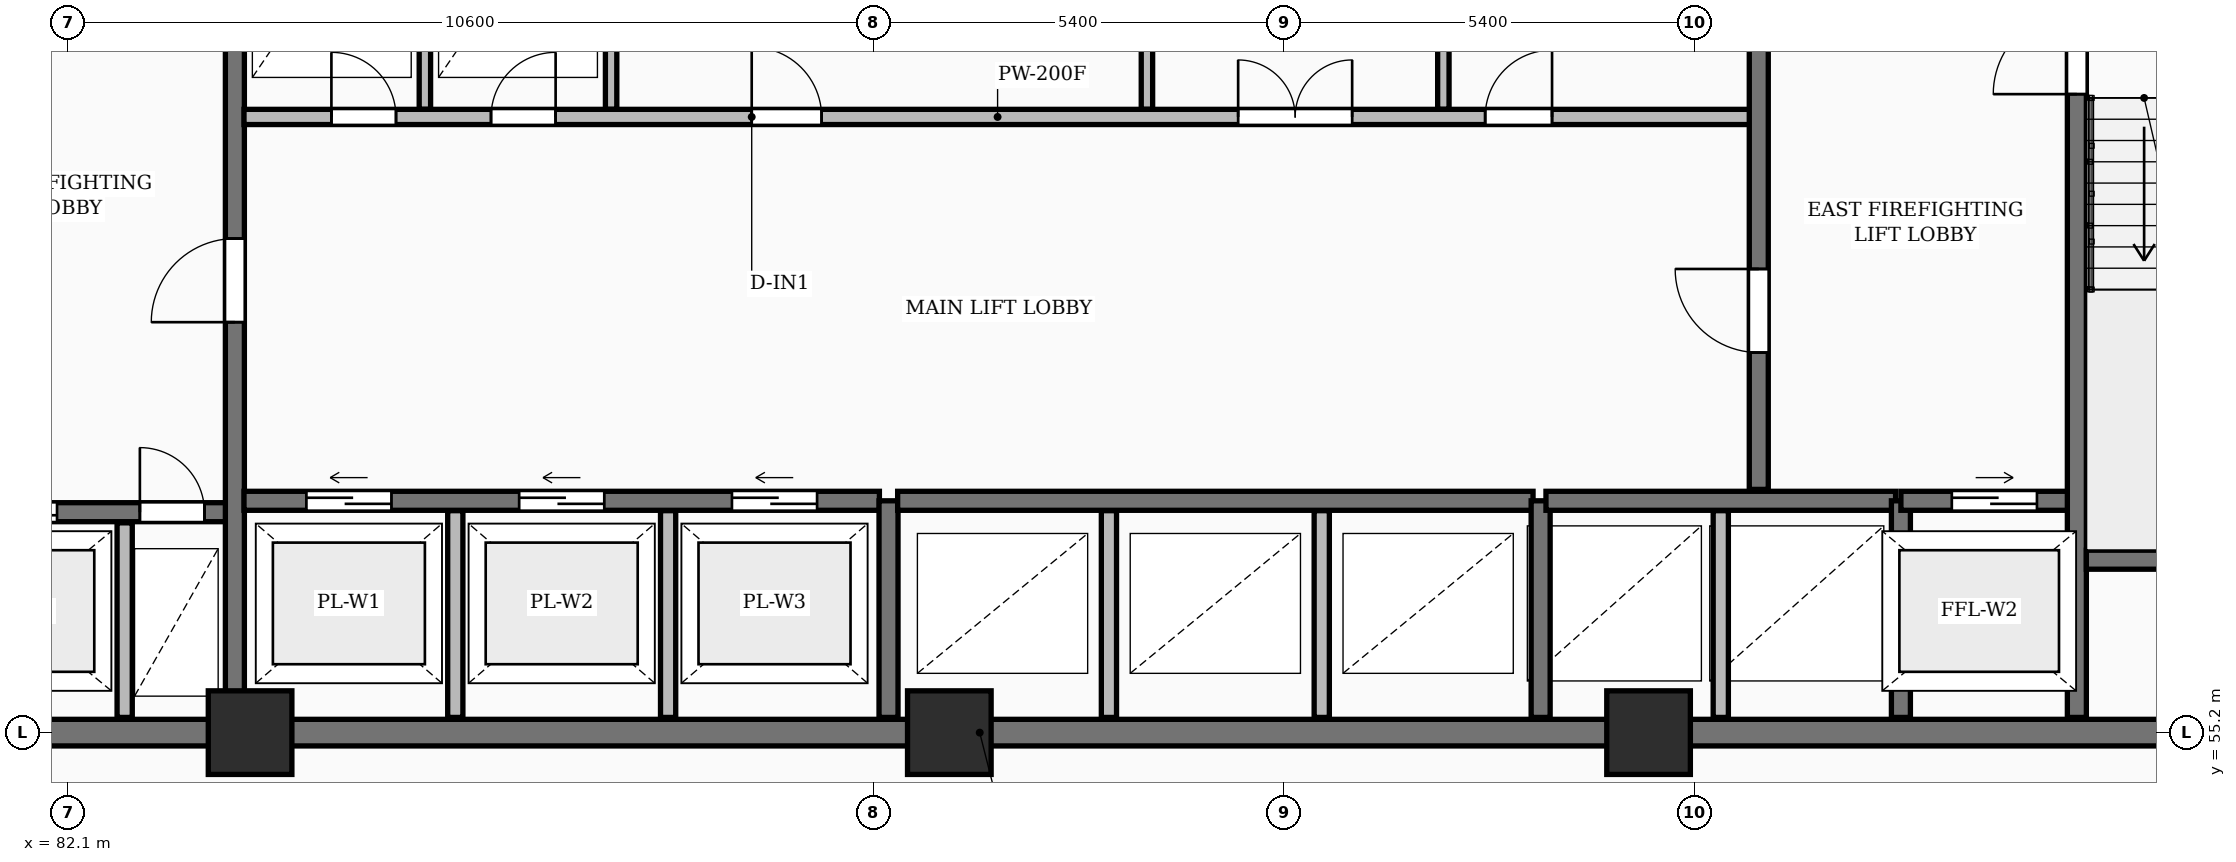
"""IFC4 building model, lengths in metres.
Left out: names, types, materials, properties, quantities, classifications, styles, units other than length and angle.
Written with IfcOpenShell. Run it as: python <this file> out.ifc"""

import sys

from ifc_helpers import new_model, si_unit, direction, frame, frame_2d, origin, origin_2d, place, context, subcontext, project, spatial, rectangle, extrude, element, fill, save


model = new_model("IFC4")
c1 = context("Model", 3, precision=1e-05, world=origin(), true_north=direction((0.0, 1.0)))
c2 = subcontext(c1, "Body", "Model", "MODEL_VIEW")
j1 = project(units=[si_unit("LENGTHUNIT", "METRE"), si_unit("PLANEANGLEUNIT", "RADIAN")], contexts=[c1])
p1 = place(None, origin())
s1 = spatial("IfcSite", under=j1, at=p1, CompositionType="ELEMENT")
p2 = place(p1, origin())
s2 = spatial("IfcBuilding", under=s1, at=p2, CompositionType="ELEMENT")
p3 = place(p2, frame((0.0, 0.0, -3.6)))
s3 = spatial("IfcBuildingStorey", under=s2, at=p3, CompositionType="ELEMENT", Elevation=-3.6)
for number, where, z_axis, x_axis in (
    (1, (84.5, 55.2, 0.0), (0.0, 0.0, 1.0), (1.0, 0.0, 0.0)),
    (2, (93.7, 55.2, 0.0), (0.0, 0.0, 1.0), (1.0, 0.0, 0.0)),
    (3, (102.9, 55.2, 0.0), (0.0, 0.0, 1.0), (1.0, 0.0, 0.0)),
):
    element("IfcColumn", number, at=place(p3, frame(where, z_axis=z_axis, x_axis=x_axis)), inside=s3, PredefinedType="COLUMN", context=c2, shape_type="SweptSolid", body=[
        extrude(rectangle(XDim=1.1, YDim=1.1, at=origin_2d()), origin(), (0.0, 0.0, 1.0), 3.6),
    ])
p4 = place(p3, frame((75.95, 55.2, 0.0), z_axis=(0.0, 0.0, 1.0), x_axis=(1.0, 0.0, 0.0)))
e4 = element("IfcWall", 4, at=p4, inside=s3, PredefinedType="SHEAR", context=c2, shape_type="SweptSolid", body=[
    extrude(rectangle(XDim=36.3, YDim=0.35, at=frame_2d((18.15, 0.0))), origin(), (0.0, 0.0, 1.0), 3.6),
])
p5 = place(p3, frame((79.79, 58.1, 0.0), z_axis=(0.0, 0.0, 1.0), x_axis=(1.0, 0.0, 0.0)))
e5 = element("IfcWall", 5, at=p5, inside=s3, PredefinedType="SHEAR", context=c2, shape_type="SweptSolid", body=[
    extrude(rectangle(XDim=4.39, YDim=0.25, at=frame_2d((2.195, 0.0))), origin(), (0.0, 0.0, 1.0), 3.6),
])
p6 = place(p5, frame((1.05, 0.0, 0.0)))
e6 = element("IfcOpeningElement", 6, at=p6, cuts=e5, PredefinedType="OPENING", context=c2, shape_type="SweptSolid", body=[
    extrude(rectangle(XDim=1.12, YDim=2.12, at=frame_2d((0.56, 1.06))), frame((0.0, 0.135, 0.0), z_axis=(0.0, -1.0, 0.0), x_axis=(1.0, 0.0, 0.0)), (0.0, 0.0, 1.0), 0.27),
])
p7 = place(p5, frame((3.26, 0.0, 0.0)))
e7 = element("IfcOpeningElement", 7, at=p7, cuts=e5, PredefinedType="OPENING", context=c2, shape_type="SweptSolid", body=[
    extrude(rectangle(XDim=0.85, YDim=2.05, at=frame_2d((0.425, 1.025))), frame((0.0, 0.135, 0.0), z_axis=(0.0, -1.0, 0.0), x_axis=(1.0, 0.0, 0.0)), (0.0, 0.0, 1.0), 0.27),
])
p8 = place(p3, frame((82.85, 55.4, 0.0), z_axis=(0.0, 0.0, 1.0), x_axis=(0.0, 1.0, 0.0)))
e8 = element("IfcWall", 8, at=p8, inside=s3, PredefinedType="PARTITIONING", context=c2, shape_type="SweptSolid", body=[
    extrude(rectangle(XDim=2.56, YDim=0.2, at=frame_2d((1.28, 0.0))), origin(), (0.0, 0.0, 1.0), 3.3),
])
p9 = place(p3, frame((84.3, 55.4, 0.0), z_axis=(0.0, 0.0, 1.0), x_axis=(0.0, 1.0, 0.0)))
e9 = element("IfcWall", 9, at=p9, inside=s3, PredefinedType="SHEAR", context=c2, shape_type="SweptSolid", body=[
    extrude(rectangle(XDim=11.6, YDim=0.25, at=frame_2d((5.8, 0.0))), origin(), (0.0, 0.0, 1.0), 3.6),
])
p10 = place(p9, frame((5.2, 0.0, 0.0)))
e10 = element("IfcOpeningElement", 10, at=p10, cuts=e9, PredefinedType="OPENING", context=c2, shape_type="SweptSolid", body=[
    extrude(rectangle(XDim=1.1, YDim=2.1, at=frame_2d((0.55, 1.05))), frame((0.0, 0.135, 0.0), z_axis=(0.0, -1.0, 0.0), x_axis=(1.0, 0.0, 0.0)), (0.0, 0.0, 1.0), 0.27),
])
for number, where, z_axis, x_axis in (
    (11, (87.2, 55.4, 0.0), (0.0, 0.0, 1.0), (0.0, 1.0, 0.0)),
    (12, (90.0, 55.4, 0.0), (0.0, 0.0, 1.0), (0.0, 1.0, 0.0)),
):
    element("IfcWall", number, at=place(p3, frame(where, z_axis=z_axis, x_axis=x_axis)), inside=s3, PredefinedType="PARTITIONING", context=c2, shape_type="SweptSolid", body=[
        extrude(rectangle(XDim=2.72, YDim=0.2, at=frame_2d((1.36, 0.0))), origin(), (0.0, 0.0, 1.0), 3.3),
    ])
p11 = place(p3, frame((84.42, 58.25, 0.0), z_axis=(0.0, 0.0, 1.0), x_axis=(1.0, 0.0, 0.0)))
e13 = element("IfcWall", 13, at=p11, inside=s3, PredefinedType="SHEAR", context=c2, shape_type="SweptSolid", body=[
    extrude(rectangle(XDim=8.36, YDim=0.25, at=frame_2d((4.18, 0.0))), origin(), (0.0, 0.0, 1.0), 3.6),
])
p12 = place(p11, frame((0.82, 0.0, 0.0)))
e14 = element("IfcOpeningElement", 14, at=p12, cuts=e13, PredefinedType="OPENING", context=c2, shape_type="SweptSolid", body=[
    extrude(rectangle(XDim=1.12, YDim=2.12, at=frame_2d((0.56, 1.06))), frame((0.0, 0.135, 0.0), z_axis=(0.0, -1.0, 0.0), x_axis=(1.0, 0.0, 0.0)), (0.0, 0.0, 1.0), 0.27),
])
p13 = place(p11, frame((3.62, 0.0, 0.0)))
e15 = element("IfcOpeningElement", 15, at=p13, cuts=e13, PredefinedType="OPENING", context=c2, shape_type="SweptSolid", body=[
    extrude(rectangle(XDim=1.12, YDim=2.12, at=frame_2d((0.56, 1.06))), frame((0.0, 0.135, 0.0), z_axis=(0.0, -1.0, 0.0), x_axis=(1.0, 0.0, 0.0)), (0.0, 0.0, 1.0), 0.27),
])
p14 = place(p11, frame((6.42, 0.0, 0.0)))
e16 = element("IfcOpeningElement", 16, at=p14, cuts=e13, PredefinedType="OPENING", context=c2, shape_type="SweptSolid", body=[
    extrude(rectangle(XDim=1.12, YDim=2.12, at=frame_2d((0.56, 1.06))), frame((0.0, 0.135, 0.0), z_axis=(0.0, -1.0, 0.0), x_axis=(1.0, 0.0, 0.0)), (0.0, 0.0, 1.0), 0.27),
])
p15 = place(p3, frame((92.9, 55.4, 0.0), z_axis=(0.0, 0.0, 1.0), x_axis=(0.0, 1.0, 0.0)))
e17 = element("IfcWall", 17, at=p15, inside=s3, PredefinedType="SHEAR", context=c2, shape_type="SweptSolid", body=[
    extrude(rectangle(XDim=2.85, YDim=0.25, at=frame_2d((1.425, 0.0))), origin(), (0.0, 0.0, 1.0), 3.6),
])
for number, where, z_axis, x_axis in (
    (18, (95.8, 55.4, 0.0), (0.0, 0.0, 1.0), (0.0, 1.0, 0.0)),
    (19, (98.6, 55.4, 0.0), (0.0, 0.0, 1.0), (0.0, 1.0, 0.0)),
):
    element("IfcWall", number, at=place(p3, frame(where, z_axis=z_axis, x_axis=x_axis)), inside=s3, PredefinedType="PARTITIONING", context=c2, shape_type="SweptSolid", body=[
        extrude(rectangle(XDim=2.72, YDim=0.2, at=frame_2d((1.36, 0.0))), origin(), (0.0, 0.0, 1.0), 3.3),
    ])
p16 = place(p3, frame((93.02, 58.25, 0.0), z_axis=(0.0, 0.0, 1.0), x_axis=(1.0, 0.0, 0.0)))
e20 = element("IfcWall", 20, at=p16, inside=s3, PredefinedType="SHEAR", context=c2, shape_type="SweptSolid", body=[
    extrude(rectangle(XDim=8.36, YDim=0.25, at=frame_2d((4.18, 0.0))), origin(), (0.0, 0.0, 1.0), 3.6),
])
p17 = place(p3, frame((101.48, 55.4, 0.0), z_axis=(0.0, 0.0, 1.0), x_axis=(0.0, 1.0, 0.0)))
e21 = element("IfcWall", 21, at=p17, inside=s3, PredefinedType="SHEAR", context=c2, shape_type="SweptSolid", body=[
    extrude(rectangle(XDim=2.85, YDim=0.25, at=frame_2d((1.425, 0.0))), origin(), (0.0, 0.0, 1.0), 3.6),
])
p18 = place(p3, frame((103.85, 55.4, 0.0), z_axis=(0.0, 0.0, 1.0), x_axis=(0.0, 1.0, 0.0)))
e22 = element("IfcWall", 22, at=p18, inside=s3, PredefinedType="PARTITIONING", context=c2, shape_type="SweptSolid", body=[
    extrude(rectangle(XDim=2.72, YDim=0.2, at=frame_2d((1.36, 0.0))), origin(), (0.0, 0.0, 1.0), 3.3),
])
p19 = place(p3, frame((101.55, 58.25, 0.0), z_axis=(0.0, 0.0, 1.0), x_axis=(1.0, 0.0, 0.0)))
e23 = element("IfcWall", 23, at=p19, inside=s3, PredefinedType="SHEAR", context=c2, shape_type="SweptSolid", body=[
    extrude(rectangle(XDim=4.6, YDim=0.25, at=frame_2d((2.3, 0.0))), origin(), (0.0, 0.0, 1.0), 3.6),
])
p20 = place(p3, frame((106.22, 55.4, 0.0), z_axis=(0.0, 0.0, 1.0), x_axis=(0.0, 1.0, 0.0)))
e24 = element("IfcWall", 24, at=p20, inside=s3, PredefinedType="SHEAR", context=c2, shape_type="SweptSolid", body=[
    extrude(rectangle(XDim=2.85, YDim=0.25, at=frame_2d((1.425, 0.0))), origin(), (0.0, 0.0, 1.0), 3.6),
])
p21 = place(p3, frame((106.22, 58.25, 0.0), z_axis=(0.0, 0.0, 1.0), x_axis=(1.0, 0.0, 0.0)))
e25 = element("IfcWall", 25, at=p21, inside=s3, PredefinedType="SHEAR", context=c2, shape_type="SweptSolid", body=[
    extrude(rectangle(XDim=2.46, YDim=0.25, at=frame_2d((1.23, 0.0))), origin(), (0.0, 0.0, 1.0), 3.6),
])
p22 = place(p21, frame((0.67, 0.0, 0.0)))
e26 = element("IfcOpeningElement", 26, at=p22, cuts=e25, PredefinedType="OPENING", context=c2, shape_type="SweptSolid", body=[
    extrude(rectangle(XDim=1.12, YDim=2.12, at=frame_2d((0.56, 1.06))), frame((0.0, 0.135, 0.0), z_axis=(0.0, -1.0, 0.0), x_axis=(1.0, 0.0, 0.0)), (0.0, 0.0, 1.0), 0.27),
])
for number, where, z_axis, x_axis in (
    (27, (86.8, 63.4, 0.0), (0.0, 0.0, 1.0), (0.0, 1.0, 0.0)),
    (28, (89.25, 63.4, 0.0), (0.0, 0.0, 1.0), (0.0, 1.0, 0.0)),
    (29, (96.3, 63.4, 0.0), (0.0, 0.0, 1.0), (0.0, 1.0, 0.0)),
    (30, (100.2, 63.4, 0.0), (0.0, 0.0, 1.0), (0.0, 1.0, 0.0)),
):
    element("IfcWall", number, at=place(p3, frame(where, z_axis=z_axis, x_axis=x_axis)), inside=s3, PredefinedType="PARTITIONING", context=c2, shape_type="SweptSolid", body=[
        extrude(rectangle(XDim=3.6, YDim=0.15, at=frame_2d((1.8, 0.0))), origin(), (0.0, 0.0, 1.0), 3.3),
    ])
p23 = place(p3, frame((84.42, 63.3, 0.0), z_axis=(0.0, 0.0, 1.0), x_axis=(1.0, 0.0, 0.0)))
e31 = element("IfcWall", 31, at=p23, inside=s3, PredefinedType="PARTITIONING", context=c2, shape_type="SweptSolid", body=[
    extrude(rectangle(XDim=19.83, YDim=0.2, at=frame_2d((9.915, 0.0))), origin(), (0.0, 0.0, 1.0), 3.3),
])
p24 = place(p23, frame((1.15, 0.0, 0.0)))
e32 = element("IfcOpeningElement", 32, at=p24, cuts=e31, PredefinedType="OPENING", context=c2, shape_type="SweptSolid", body=[
    extrude(rectangle(XDim=0.85, YDim=2.05, at=frame_2d((0.425, 1.025))), frame((0.0, 0.11, 0.0), z_axis=(0.0, -1.0, 0.0), x_axis=(1.0, 0.0, 0.0)), (0.0, 0.0, 1.0), 0.22),
])
p25 = place(p23, frame((3.25, 0.0, 0.0)))
e33 = element("IfcOpeningElement", 33, at=p25, cuts=e31, PredefinedType="OPENING", context=c2, shape_type="SweptSolid", body=[
    extrude(rectangle(XDim=0.85, YDim=2.05, at=frame_2d((0.425, 1.025))), frame((0.0, 0.11, 0.0), z_axis=(0.0, -1.0, 0.0), x_axis=(1.0, 0.0, 0.0)), (0.0, 0.0, 1.0), 0.22),
])
p26 = place(p23, frame((13.08, 0.0, 0.0)))
e34 = element("IfcOpeningElement", 34, at=p26, cuts=e31, PredefinedType="OPENING", context=c2, shape_type="SweptSolid", body=[
    extrude(rectangle(XDim=1.5, YDim=2.2, at=frame_2d((0.75, 1.1))), frame((0.0, 0.11, 0.0), z_axis=(0.0, -1.0, 0.0), x_axis=(1.0, 0.0, 0.0)), (0.0, 0.0, 1.0), 0.22),
])
p27 = place(p23, frame((6.68, 0.0, 0.0)))
e35 = element("IfcOpeningElement", 35, at=p27, cuts=e31, PredefinedType="OPENING", context=c2, shape_type="SweptSolid", body=[
    extrude(rectangle(XDim=0.92, YDim=2.08, at=frame_2d((0.46, 1.04))), frame((0.0, 0.11, 0.0), z_axis=(0.0, -1.0, 0.0), x_axis=(1.0, 0.0, 0.0)), (0.0, 0.0, 1.0), 0.22),
])
p28 = place(p23, frame((16.33, 0.0, 0.0)))
e36 = element("IfcOpeningElement", 36, at=p28, cuts=e31, PredefinedType="OPENING", context=c2, shape_type="SweptSolid", body=[
    extrude(rectangle(XDim=0.88, YDim=2.06, at=frame_2d((0.44, 1.03))), frame((0.0, 0.11, 0.0), z_axis=(0.0, -1.0, 0.0), x_axis=(1.0, 0.0, 0.0)), (0.0, 0.0, 1.0), 0.22),
])
p29 = place(p3, frame((104.35, 58.4, 0.0), z_axis=(0.0, 0.0, 1.0), x_axis=(0.0, 1.0, 0.0)))
e37 = element("IfcWall", 37, at=p29, inside=s3, PredefinedType="SHEAR", context=c2, shape_type="SweptSolid", body=[
    extrude(rectangle(XDim=8.6, YDim=0.25, at=frame_2d((4.3, 0.0))), origin(), (0.0, 0.0, 1.0), 3.6),
])
p30 = place(p29, frame((1.8, 0.0, 0.0)))
e38 = element("IfcOpeningElement", 38, at=p30, cuts=e37, PredefinedType="OPENING", context=c2, shape_type="SweptSolid", body=[
    extrude(rectangle(XDim=1.1, YDim=2.1, at=frame_2d((0.55, 1.05))), frame((0.0, 0.135, 0.0), z_axis=(0.0, -1.0, 0.0), x_axis=(1.0, 0.0, 0.0)), (0.0, 0.0, 1.0), 0.27),
])
p31 = place(p3, frame((108.535, 55.4, 0.0), z_axis=(0.0, 0.0, 1.0), x_axis=(0.0, 1.0, 0.0)))
e39 = element("IfcWall", 39, at=p31, inside=s3, PredefinedType="SHEAR", context=c2, shape_type="SweptSolid", body=[
    extrude(rectangle(XDim=11.6, YDim=0.25, at=frame_2d((5.8, 0.0))), origin(), (0.0, 0.0, 1.0), 3.6),
])
p32 = place(p31, frame((8.2, 0.0, 0.0)))
e40 = element("IfcOpeningElement", 40, at=p32, cuts=e39, PredefinedType="OPENING", context=c2, shape_type="SweptSolid", body=[
    extrude(rectangle(XDim=1.1, YDim=2.1, at=frame_2d((0.55, 1.05))), frame((0.0, 0.135, 0.0), z_axis=(0.0, -1.0, 0.0), x_axis=(1.0, 0.0, 0.0)), (0.0, 0.0, 1.0), 0.27),
])
p33 = place(p31, frame((10.25, 0.0, 0.0)))
e41 = element("IfcOpeningElement", 41, at=p33, cuts=e39, PredefinedType="OPENING", context=c2, shape_type="SweptSolid", body=[
    extrude(rectangle(XDim=0.85, YDim=2.05, at=frame_2d((0.425, 1.025))), frame((0.0, 0.135, 0.0), z_axis=(0.0, -1.0, 0.0), x_axis=(1.0, 0.0, 0.0)), (0.0, 0.0, 1.0), 0.27),
])
p34 = place(p3, frame((108.66, 57.475, 0.0), z_axis=(0.0, 0.0, 1.0), x_axis=(1.0, 0.0, 0.0)))
e42 = element("IfcWall", 42, at=p34, inside=s3, PredefinedType="SHEAR", context=c2, shape_type="SweptSolid", body=[
    extrude(rectangle(XDim=3.24, YDim=0.25, at=frame_2d((1.62, 0.0))), origin(), (0.0, 0.0, 1.0), 3.6),
])
p35 = place(p6, origin())
e43 = element("IfcDoor", 43, at=p35, inside=s3, OperationType="SLIDING_TO_LEFT", PredefinedType="DOOR", context=c2, shape_type="SweptSolid", body=[
    extrude(rectangle(XDim=1.12, YDim=2.12, at=frame_2d((0.56, 1.06))), frame((0.0, 0.025, 0.0), z_axis=(0.0, -1.0, 0.0), x_axis=(1.0, 0.0, 0.0)), (0.0, 0.0, 1.0), 0.05),
])
fill(e6, e43)
p36 = place(p7, origin())
e44 = element("IfcDoor", 44, at=p36, inside=s3, OperationType="SINGLE_SWING_LEFT", PredefinedType="DOOR", context=c2, shape_type="SweptSolid", body=[
    extrude(rectangle(XDim=0.85, YDim=2.05, at=frame_2d((0.425, 1.025))), frame((0.0, 0.025, 0.0), z_axis=(0.0, -1.0, 0.0), x_axis=(1.0, 0.0, 0.0)), (0.0, 0.0, 1.0), 0.05),
])
fill(e7, e44)
p37 = place(p10, origin())
e45 = element("IfcDoor", 45, at=p37, inside=s3, OperationType="SINGLE_SWING_LEFT", PredefinedType="DOOR", context=c2, shape_type="SweptSolid", body=[
    extrude(rectangle(XDim=1.1, YDim=2.1, at=frame_2d((0.55, 1.05))), frame((0.0, 0.025, 0.0), z_axis=(0.0, -1.0, 0.0), x_axis=(1.0, 0.0, 0.0)), (0.0, 0.0, 1.0), 0.05),
])
fill(e10, e45)
p38 = place(p12, origin())
e46 = element("IfcDoor", 46, at=p38, inside=s3, OperationType="SLIDING_TO_LEFT", PredefinedType="DOOR", context=c2, shape_type="SweptSolid", body=[
    extrude(rectangle(XDim=1.12, YDim=2.12, at=frame_2d((0.56, 1.06))), frame((0.0, 0.025, 0.0), z_axis=(0.0, -1.0, 0.0), x_axis=(1.0, 0.0, 0.0)), (0.0, 0.0, 1.0), 0.05),
])
fill(e14, e46)
p39 = place(p13, origin())
e47 = element("IfcDoor", 47, at=p39, inside=s3, OperationType="SLIDING_TO_LEFT", PredefinedType="DOOR", context=c2, shape_type="SweptSolid", body=[
    extrude(rectangle(XDim=1.12, YDim=2.12, at=frame_2d((0.56, 1.06))), frame((0.0, 0.025, 0.0), z_axis=(0.0, -1.0, 0.0), x_axis=(1.0, 0.0, 0.0)), (0.0, 0.0, 1.0), 0.05),
])
fill(e15, e47)
p40 = place(p14, origin())
e48 = element("IfcDoor", 48, at=p40, inside=s3, OperationType="SLIDING_TO_LEFT", PredefinedType="DOOR", context=c2, shape_type="SweptSolid", body=[
    extrude(rectangle(XDim=1.12, YDim=2.12, at=frame_2d((0.56, 1.06))), frame((0.0, 0.025, 0.0), z_axis=(0.0, -1.0, 0.0), x_axis=(1.0, 0.0, 0.0)), (0.0, 0.0, 1.0), 0.05),
])
fill(e16, e48)
p41 = place(p22, origin())
e49 = element("IfcDoor", 49, at=p41, inside=s3, OperationType="SLIDING_TO_RIGHT", PredefinedType="DOOR", context=c2, shape_type="SweptSolid", body=[
    extrude(rectangle(XDim=1.12, YDim=2.12, at=frame_2d((0.56, 1.06))), frame((0.0, 0.025, 0.0), z_axis=(0.0, -1.0, 0.0), x_axis=(1.0, 0.0, 0.0)), (0.0, 0.0, 1.0), 0.05),
])
fill(e26, e49)
p42 = place(p24, origin())
e50 = element("IfcDoor", 50, at=p42, inside=s3, OperationType="SINGLE_SWING_LEFT", PredefinedType="DOOR", context=c2, shape_type="SweptSolid", body=[
    extrude(rectangle(XDim=0.85, YDim=2.05, at=frame_2d((0.425, 1.025))), frame((0.0, 0.025, 0.0), z_axis=(0.0, -1.0, 0.0), x_axis=(1.0, 0.0, 0.0)), (0.0, 0.0, 1.0), 0.05),
])
fill(e32, e50)
p43 = place(p25, origin())
e51 = element("IfcDoor", 51, at=p43, inside=s3, OperationType="SINGLE_SWING_RIGHT", PredefinedType="DOOR", context=c2, shape_type="SweptSolid", body=[
    extrude(rectangle(XDim=0.85, YDim=2.05, at=frame_2d((0.425, 1.025))), frame((0.0, 0.025, 0.0), z_axis=(0.0, -1.0, 0.0), x_axis=(1.0, 0.0, 0.0)), (0.0, 0.0, 1.0), 0.05),
])
fill(e33, e51)
p44 = place(p26, origin())
e52 = element("IfcDoor", 52, at=p44, inside=s3, OperationType="DOUBLE_DOOR_SINGLE_SWING", PredefinedType="DOOR", context=c2, shape_type="SweptSolid", body=[
    extrude(rectangle(XDim=1.5, YDim=2.2, at=frame_2d((0.75, 1.1))), frame((0.0, 0.025, 0.0), z_axis=(0.0, -1.0, 0.0), x_axis=(1.0, 0.0, 0.0)), (0.0, 0.0, 1.0), 0.05),
])
fill(e34, e52)
p45 = place(p27, origin())
e53 = element("IfcDoor", 53, at=p45, inside=s3, OperationType="SINGLE_SWING_LEFT", PredefinedType="DOOR", context=c2, shape_type="SweptSolid", body=[
    extrude(rectangle(XDim=0.92, YDim=2.08, at=frame_2d((0.46, 1.04))), frame((0.0, 0.025, 0.0), z_axis=(0.0, -1.0, 0.0), x_axis=(1.0, 0.0, 0.0)), (0.0, 0.0, 1.0), 0.05),
])
fill(e35, e53)
p46 = place(p28, origin())
e54 = element("IfcDoor", 54, at=p46, inside=s3, OperationType="SINGLE_SWING_RIGHT", PredefinedType="DOOR", context=c2, shape_type="SweptSolid", body=[
    extrude(rectangle(XDim=0.88, YDim=2.06, at=frame_2d((0.44, 1.03))), frame((0.0, 0.025, 0.0), z_axis=(0.0, -1.0, 0.0), x_axis=(1.0, 0.0, 0.0)), (0.0, 0.0, 1.0), 0.05),
])
fill(e36, e54)
p47 = place(p30, origin())
e55 = element("IfcDoor", 55, at=p47, inside=s3, OperationType="SINGLE_SWING_RIGHT", PredefinedType="DOOR", context=c2, shape_type="SweptSolid", body=[
    extrude(rectangle(XDim=1.1, YDim=2.1, at=frame_2d((0.55, 1.05))), frame((0.0, 0.025, 0.0), z_axis=(0.0, -1.0, 0.0), x_axis=(1.0, 0.0, 0.0)), (0.0, 0.0, 1.0), 0.05),
])
fill(e38, e55)
p48 = place(p32, origin())
e56 = element("IfcDoor", 56, at=p48, inside=s3, OperationType="SINGLE_SWING_LEFT", PredefinedType="DOOR", context=c2, shape_type="SweptSolid", body=[
    extrude(rectangle(XDim=1.1, YDim=2.1, at=frame_2d((0.55, 1.05))), frame((0.0, 0.025, 0.0), z_axis=(0.0, -1.0, 0.0), x_axis=(1.0, 0.0, 0.0)), (0.0, 0.0, 1.0), 0.05),
])
fill(e40, e56)
save(model, sys.argv[1])
